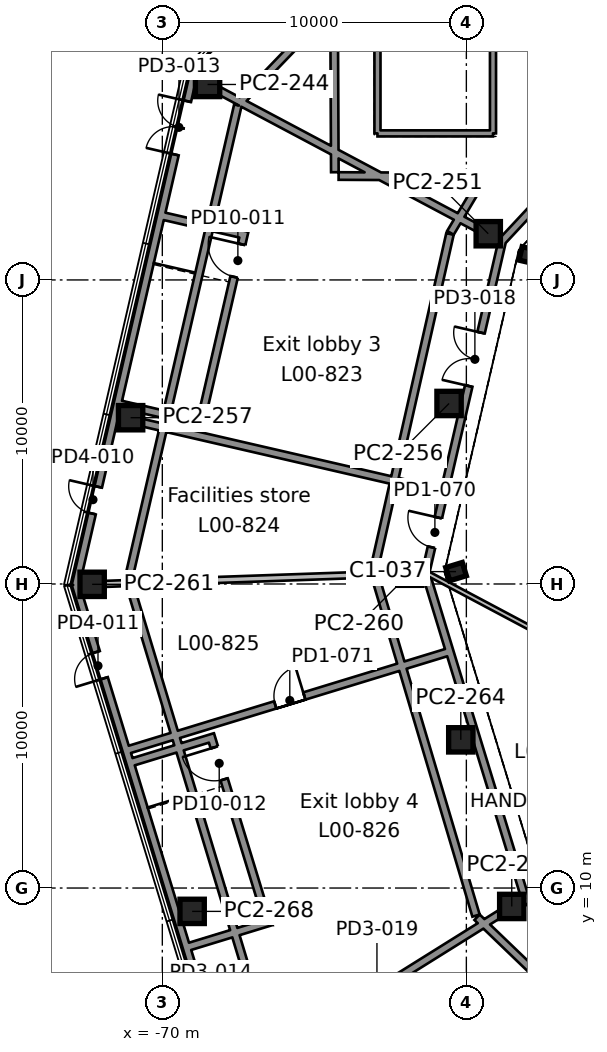
"""IFC4 building model, lengths in metres.
Left out: names, types, materials, properties, quantities, classifications, styles, units other than length and angle.
Written with IfcOpenShell. Run it as: python <this file> out.ifc"""

import sys

from ifc_helpers import new_model, si_unit, direction, frame, frame_2d, origin, origin_2d, place, context, subcontext, project, spatial, rectangle, i_section, extrude, element, fill, save


model = new_model("IFC4")
c1 = context("Model", 3, precision=1e-05, world=origin(), true_north=direction((0.0, 1.0)))
c2 = subcontext(c1, "Body", "Model", "MODEL_VIEW")
j1 = project(units=[si_unit("LENGTHUNIT", "METRE"), si_unit("PLANEANGLEUNIT", "RADIAN")], contexts=[c1])
p1 = place(None, origin())
s1 = spatial("IfcSite", under=j1, at=p1, CompositionType="ELEMENT")
p2 = place(p1, origin())
s2 = spatial("IfcBuilding", under=s1, at=p2, CompositionType="ELEMENT")
p3 = place(p2, origin())
s3 = spatial("IfcBuildingStorey", under=s2, at=p3, CompositionType="ELEMENT", Elevation=0.0)
for number, where, z_axis, x_axis in (
    (1, (-60.34, 20.407, 0.0), (0.0, 0.0, 1.0), (0.292, -0.956, 0.0)),
    (2, (-57.939, 30.807, 0.0), (0.0, 0.0, 1.0), (-0.225, -0.974, 0.0)),
):
    element("IfcColumn", number, at=place(p3, frame(where, z_axis=z_axis, x_axis=x_axis)), inside=s3, PredefinedType="COLUMN", context=c2, shape_type="SweptSolid", body=[
        extrude(i_section(OverallWidth=0.455, OverallDepth=0.569, WebThickness=0.078, FlangeThickness=0.125, FilletRadius=0.015, at=origin_2d()), origin(), (0.0, 0.0, 1.0), 7.0),
    ])
for number, where, z_axis, x_axis in (
    (3, (-69.019, 9.232, 0.0), (0.0, 0.0, 1.0), (1.0, 0.0, 0.0)),
    (4, (-58.507, 9.394, 0.0), (0.0, 0.0, 1.0), (1.0, 0.0, 0.0)),
    (5, (-60.183, 14.874, 0.0), (0.0, 0.0, 1.0), (1.0, 0.0, 0.0)),
    (6, (-72.308, 19.989, 0.0), (0.0, 0.0, 1.0), (1.0, 0.0, 0.0)),
    (7, (-61.858, 20.354, 0.0), (0.0, 0.0, 1.0), (1.0, 0.0, 0.0)),
    (8, (-71.043, 25.469, 0.0), (0.0, 0.0, 1.0), (1.0, 0.0, 0.0)),
    (9, (-60.569, 25.937, 0.0), (0.0, 0.0, 1.0), (1.0, 0.0, 0.0)),
    (10, (-59.28, 31.52, 0.0), (0.0, 0.0, 1.0), (1.0, 0.0, 0.0)),
    (11, (-68.512, 36.429, 0.0), (0.0, 0.0, 1.0), (1.0, 0.0, 0.0)),
):
    element("IfcColumn", number, at=place(p3, frame(where, z_axis=z_axis, x_axis=x_axis)), inside=s3, PredefinedType="COLUMN", context=c2, shape_type="SweptSolid", body=[
        extrude(rectangle(XDim=0.8, YDim=0.8, at=origin_2d()), origin(), (0.0, 0.0, 1.0), 6.37),
    ])
p4 = place(p3, frame((-69.034, 36.837, 0.0), z_axis=(0.0, 0.0, 1.0), x_axis=(-0.224951161352, -0.974370040081, 0.0)))
e12 = element("IfcWall", 12, at=p4, inside=s3, PredefinedType="SOLIDWALL", context=c2, shape_type="SweptSolid", body=[
    extrude(rectangle(XDim=17.314, YDim=0.4, at=frame_2d((8.657, 0.0))), origin(), (0.0, 0.0, 1.0), 6.37),
])
p5 = place(p4, frame((0.966, 0.0, 0.0)))
e13 = element("IfcOpeningElement", 13, at=p5, cuts=e12, PredefinedType="OPENING", context=c2, shape_type="SweptSolid", body=[
    extrude(rectangle(XDim=1.8, YDim=2.1, at=frame_2d((0.9, 1.05))), frame((0.0, 0.21, 0.0), z_axis=(0.0, -1.0, 0.0), x_axis=(1.0, 0.0, 0.0)), (0.0, 0.0, 1.0), 0.42),
])
p6 = place(p4, frame((13.984, 0.0, 0.0)))
e14 = element("IfcOpeningElement", 14, at=p6, cuts=e12, PredefinedType="OPENING", context=c2, shape_type="SweptSolid", body=[
    extrude(rectangle(XDim=0.9, YDim=2.1, at=frame_2d((0.45, 1.05))), frame((0.0, 0.21, 0.0), z_axis=(0.0, -1.0, 0.0), x_axis=(1.0, 0.0, 0.0)), (0.0, 0.0, 1.0), 0.42),
])
p7 = place(p3, frame((-72.929, 19.967, 0.0), z_axis=(0.0, 0.0, 1.0), x_axis=(0.292376176059, -0.956303388927, 0.0)))
e15 = element("IfcWall", 15, at=p7, inside=s3, PredefinedType="SOLIDWALL", context=c2, shape_type="SweptSolid", body=[
    extrude(rectangle(XDim=17.194, YDim=0.4, at=frame_2d((8.597, 0.0))), origin(), (0.0, 0.0, 1.0), 6.37),
])
p8 = place(p7, frame((2.33, 0.0, 0.0)))
e16 = element("IfcOpeningElement", 16, at=p8, cuts=e15, PredefinedType="OPENING", context=c2, shape_type="SweptSolid", body=[
    extrude(rectangle(XDim=0.9, YDim=2.1, at=frame_2d((0.45, 1.05))), frame((0.0, 0.21, 0.0), z_axis=(0.0, -1.0, 0.0), x_axis=(1.0, 0.0, 0.0)), (0.0, 0.0, 1.0), 0.42),
])
p9 = place(p7, frame((14.548, 0.0, 0.0)))
e17 = element("IfcOpeningElement", 17, at=p9, cuts=e15, PredefinedType="OPENING", context=c2, shape_type="SweptSolid", body=[
    extrude(rectangle(XDim=1.8, YDim=2.1, at=frame_2d((0.9, 1.05))), frame((0.0, 0.21, 0.0), z_axis=(0.0, -1.0, 0.0), x_axis=(1.0, 0.0, 0.0)), (0.0, 0.0, 1.0), 0.42),
])
p10 = place(p3, frame((-66.428, 4.605, 7.0), z_axis=(0.0, 0.0, 1.0), x_axis=(-0.289217899345, 0.957263290166, 0.0)))
e18 = element("IfcWall", 18, at=p10, inside=s3, PredefinedType="STANDARD", context=c2, shape_type="SweptSolid", body=[
    extrude(rectangle(XDim=16.189, YDim=0.25, at=frame_2d((8.094, 0.0))), origin(), (0.0, 0.0, 1.0), 0.65),
])
p11 = place(p3, frame((-71.112, 20.166, 7.0), z_axis=(0.0, 0.0, 1.0), x_axis=(0.22494984807, 0.974370343275, 0.0)))
e19 = element("IfcWall", 19, at=p11, inside=s3, PredefinedType="STANDARD", context=c2, shape_type="SweptSolid", body=[
    extrude(rectangle(XDim=15.987, YDim=0.25, at=frame_2d((7.993, 0.0))), origin(), (0.0, 0.0, 1.0), 0.65),
])
p12 = place(p3, frame((-67.484, 35.801, 7.0), z_axis=(0.0, 0.0, 1.0), x_axis=(0.693207741867, 0.720737834872, 0.0)))
e20 = element("IfcWall", 20, at=p12, inside=s3, PredefinedType="STANDARD", context=c2, shape_type="SweptSolid", body=[
    extrude(rectangle(XDim=3.991, YDim=0.25, at=frame_2d((1.995, 0.0))), origin(), (0.0, 0.0, 1.0), 0.65),
])
p13 = place(p3, frame((-64.348, 38.44, 7.0), z_axis=(0.0, 0.0, 1.0), x_axis=(0.004635810811, -0.999989254571, 0.0)))
e21 = element("IfcWall", 21, at=p13, inside=s3, PredefinedType="STANDARD", context=c2, shape_type="SweptSolid", body=[
    extrude(rectangle(XDim=4.898, YDim=0.25, at=frame_2d((2.449, 0.0))), origin(), (0.0, 0.0, 1.0), 0.65),
])
p14 = place(p3, frame((-64.201, 33.418, 7.0), z_axis=(0.0, 0.0, 1.0), x_axis=(0.99998580333, -0.005328521155, 0.0)))
e22 = element("IfcWall", 22, at=p14, inside=s3, PredefinedType="STANDARD", context=c2, shape_type="SweptSolid", body=[
    extrude(rectangle(XDim=4.261, YDim=0.25, at=frame_2d((2.13, 0.0))), origin(), (0.0, 0.0, 1.0), 0.65),
])
p15 = place(p3, frame((-59.854, 33.36, 7.0), z_axis=(0.0, 0.0, 1.0), x_axis=(0.715006669013, -0.699117631924, 0.0)))
e23 = element("IfcWall", 23, at=p15, inside=s3, PredefinedType="STANDARD", context=c2, shape_type="SweptSolid", body=[
    extrude(rectangle(XDim=0.261, YDim=0.25, at=frame_2d((0.131, 0.0))), origin(), (0.0, 0.0, 1.0), 0.65),
])
p16 = place(p3, frame((-59.647, 33.024, 7.0), z_axis=(0.0, 0.0, 1.0), x_axis=(-0.511061192034, -0.859544331606, 0.0)))
e24 = element("IfcWall", 24, at=p16, inside=s3, PredefinedType="STANDARD", context=c2, shape_type="SweptSolid", body=[
    extrude(rectangle(XDim=1.716, YDim=0.25, at=frame_2d((0.858, 0.0))), origin(), (0.0, 0.0, 1.0), 0.65),
])
p17 = place(p3, frame((-60.539, 31.513, 7.0), z_axis=(0.0, 0.0, 1.0), x_axis=(-0.220607009729, -0.975362777257, 0.0)))
e25 = element("IfcWall", 25, at=p17, inside=s3, PredefinedType="STANDARD", context=c2, shape_type="SweptSolid", body=[
    extrude(rectangle(XDim=11.344, YDim=0.25, at=frame_2d((5.672, 0.0))), origin(), (0.0, 0.0, 1.0), 0.65),
])
p18 = place(p3, frame((-63.039, 20.385, 7.0), z_axis=(0.0, 0.0, 1.0), x_axis=(0.284972326549, -0.9585357443, 0.0)))
e26 = element("IfcWall", 26, at=p18, inside=s3, PredefinedType="STANDARD", context=c2, shape_type="SweptSolid", body=[
    extrude(rectangle(XDim=11.781, YDim=0.25, at=frame_2d((5.89, 0.0))), origin(), (0.0, 0.0, 1.0), 0.65),
])
p19 = place(p3, frame((-59.649, 9.039, 7.0), z_axis=(0.0, 0.0, 1.0), x_axis=(0.721064848091, -0.692867581034, 0.0)))
e27 = element("IfcWall", 27, at=p19, inside=s3, PredefinedType="STANDARD", context=c2, shape_type="SweptSolid", body=[
    extrude(rectangle(XDim=11.94, YDim=0.25, at=frame_2d((5.97, 0.0))), origin(), (0.0, 0.0, 1.0), 0.65),
])
for number, where, z_axis, x_axis in (
    (28, (-59.124, 34.82, 6.92), (0.0, 0.0, 1.0), (-1.0, 0.0, 0.0)),
    (29, (-62.924, 34.82, 6.92), (0.0, 0.0, 1.0), (0.0, 1.0, 0.0)),
    (30, (-59.124, 38.62, 6.92), (0.0, 0.0, 1.0), (0.0, -1.0, 0.0)),
):
    element("IfcWall", number, at=place(p3, frame(where, z_axis=z_axis, x_axis=x_axis)), inside=s3, PredefinedType="SOLIDWALL", context=c2, shape_type="SweptSolid", body=[
        extrude(rectangle(XDim=3.8, YDim=0.2, at=frame_2d((1.9, 0.0))), origin(), (0.0, 0.0, 1.0), 0.18),
    ])
p20 = place(p3, frame((-68.112, 36.216, 0.0), z_axis=(0.0, 0.0, 1.0), x_axis=(0.882949504028, -0.469467968382, 0.0)))
e31 = element("IfcWall", 31, at=p20, inside=s3, PredefinedType="SOLIDWALL", context=c2, shape_type="SweptSolid", body=[
    extrude(rectangle(XDim=9.55, YDim=0.25, at=frame_2d((4.775, 0.0))), origin(), (0.0, 0.0, 1.0), 6.37),
])
p21 = place(p3, frame((-58.824, 31.273, 0.0), z_axis=(0.0, 0.0, 1.0), x_axis=(0.681856343792, 0.73148610816, 0.0)))
e32 = element("IfcWall", 32, at=p21, inside=s3, PredefinedType="SOLIDWALL", context=c2, shape_type="SweptSolid", body=[
    extrude(rectangle(XDim=5.519, YDim=0.25, at=frame_2d((2.76, 0.0))), origin(), (0.0, 0.0, 1.0), 6.37),
])
p22 = place(p3, frame((-70.643, 25.303, 0.0), z_axis=(0.0, 0.0, 1.0), x_axis=(0.974368540913, -0.224957654857, 0.0)))
e33 = element("IfcWall", 33, at=p22, inside=s3, PredefinedType="SOLIDWALL", context=c2, shape_type="SweptSolid", body=[
    extrude(rectangle(XDim=10.173, YDim=0.25, at=frame_2d((5.087, 0.0))), origin(), (0.0, 0.0, 1.0), 6.37),
])
p23 = place(p3, frame((-60.731, 23.01, 0.0), z_axis=(0.0, 0.0, 1.0), x_axis=(0.225176723851, 0.974317937347, 0.0)))
e34 = element("IfcWall", 34, at=p23, inside=s3, PredefinedType="SOLIDWALL", context=c2, shape_type="SweptSolid", body=[
    extrude(rectangle(XDim=8.487, YDim=0.25, at=frame_2d((4.244, 0.0))), origin(), (0.0, 0.0, 1.0), 6.37),
])
p24 = place(p23, frame((3.594, 0.0, 0.0)))
e35 = element("IfcOpeningElement", 35, at=p24, cuts=e34, PredefinedType="OPENING", context=c2, shape_type="SweptSolid", body=[
    extrude(rectangle(XDim=1.8, YDim=2.1, at=frame_2d((0.9, 1.05))), frame((0.0, 0.135, 0.0), z_axis=(0.0, -1.0, 0.0), x_axis=(1.0, 0.0, 0.0)), (0.0, 0.0, 1.0), 0.27),
])
p25 = place(p3, frame((-71.908, 20.003, 0.0), z_axis=(0.0, 0.0, 1.0), x_axis=(0.999391072451, 0.034892467742, 0.0)))
e36 = element("IfcWall", 36, at=p25, inside=s3, PredefinedType="PARTITIONING", context=c2, shape_type="SweptSolid", body=[
    extrude(rectangle(XDim=9.656, YDim=0.2, at=frame_2d((4.828, 0.0))), origin(), (0.0, 0.0, 1.0), 6.37),
])
p26 = place(p3, frame((-61.338, 20.382, 0.0), z_axis=(0.0, 0.0, 1.0), x_axis=(0.224998426256, 0.974359126905, 0.0)))
e37 = element("IfcWall", 37, at=p26, inside=s3, PredefinedType="SOLIDWALL", context=c2, shape_type="SweptSolid", body=[
    extrude(rectangle(XDim=2.695, YDim=0.25, at=frame_2d((1.348, 0.0))), origin(), (0.0, 0.0, 1.0), 6.37),
])
p27 = place(p26, frame((0.848, 0.0, 0.0)))
e38 = element("IfcOpeningElement", 38, at=p27, cuts=e37, PredefinedType="OPENING", context=c2, shape_type="SweptSolid", body=[
    extrude(rectangle(XDim=1.0, YDim=2.1, at=frame_2d((0.5, 1.05))), frame((0.0, 0.135, 0.0), z_axis=(0.0, -1.0, 0.0), x_axis=(1.0, 0.0, 0.0)), (0.0, 0.0, 1.0), 0.27),
])
p28 = place(p3, frame((-71.067, 14.562, 0.0), z_axis=(0.0, 0.0, 1.0), x_axis=(0.956304866869, 0.292371341965, 0.0)))
e39 = element("IfcWall", 39, at=p28, inside=s3, PredefinedType="SOLIDWALL", context=c2, shape_type="SweptSolid", body=[
    extrude(rectangle(XDim=11.0, YDim=0.25, at=frame_2d((5.5, 0.0))), origin(), (0.0, 0.0, 1.0), 6.37),
])
p29 = place(p28, frame((5.0, 0.0, 0.0)))
e40 = element("IfcOpeningElement", 40, at=p29, cuts=e39, PredefinedType="OPENING", context=c2, shape_type="SweptSolid", body=[
    extrude(rectangle(XDim=1.0, YDim=2.1, at=frame_2d((0.5, 1.05))), frame((0.0, 0.135, 0.0), z_axis=(0.0, -1.0, 0.0), x_axis=(1.0, 0.0, 0.0)), (0.0, 0.0, 1.0), 0.27),
])
p30 = place(p3, frame((-60.549, 17.783, 0.0), z_axis=(0.0, 0.0, 1.0), x_axis=(-0.291634808329, 0.956529737421, 0.0)))
e41 = element("IfcWall", 41, at=p30, inside=s3, PredefinedType="SOLIDWALL", context=c2, shape_type="SweptSolid", body=[
    extrude(rectangle(XDim=2.71, YDim=0.25, at=frame_2d((1.355, 0.0))), origin(), (0.0, 0.0, 1.0), 6.37),
])
p31 = place(p3, frame((-58.065, 9.666, 0.0), z_axis=(0.0, 0.0, 1.0), x_axis=(-0.292613894095, 0.956230677704, 0.0)))
e42 = element("IfcWall", 42, at=p31, inside=s3, PredefinedType="SOLIDWALL", context=c2, shape_type="SweptSolid", body=[
    extrude(rectangle(XDim=8.487, YDim=0.25, at=frame_2d((4.244, 0.0))), origin(), (0.0, 0.0, 1.0), 6.37),
])
p32 = place(p3, frame((-66.975, 4.103, 0.0), z_axis=(0.0, 0.0, 1.0), x_axis=(0.848048758951, 0.529918203539, 0.0)))
e43 = element("IfcWall", 43, at=p32, inside=s3, PredefinedType="SOLIDWALL", context=c2, shape_type="SweptSolid", body=[
    extrude(rectangle(XDim=9.514, YDim=0.25, at=frame_2d((4.757, 0.0))), origin(), (0.0, 0.0, 1.0), 6.37),
])
p33 = place(p32, frame((3.857, 0.0, 0.0)))
e44 = element("IfcOpeningElement", 44, at=p33, cuts=e43, PredefinedType="OPENING", context=c2, shape_type="SweptSolid", body=[
    extrude(rectangle(XDim=1.8, YDim=2.1, at=frame_2d((0.9, 1.05))), frame((0.0, 0.135, 0.0), z_axis=(0.0, -1.0, 0.0), x_axis=(1.0, 0.0, 0.0)), (0.0, 0.0, 1.0), 0.27),
])
p34 = place(p3, frame((-61.338, 20.382, 0.0), z_axis=(0.0, 0.0, 1.0), x_axis=(0.882969363327, -0.4694306162, 0.0)))
e45 = element("IfcWall", 45, at=p34, inside=s3, PredefinedType="PARTITIONING", context=c2, shape_type="SweptSolid", body=[
    extrude(rectangle(XDim=0.799, YDim=0.15, at=frame_2d((0.4, 0.0))), origin(), (0.0, 0.0, 1.0), 6.55),
])
p35 = place(p3, frame((-60.632, 20.007, 0.0), z_axis=(0.0, 0.0, 1.0), x_axis=(0.882940733586, -0.469484462975, 0.0)))
e46 = element("IfcWall", 46, at=p35, inside=s3, PredefinedType="PARTITIONING", context=c2, shape_type="SweptSolid", body=[
    extrude(rectangle(XDim=9.83, YDim=0.15, at=frame_2d((4.915, 0.0))), origin(), (0.0, 0.0, 1.0), 6.55),
])
p36 = place(p35, frame((4.337, 0.0, 0.0)))
e47 = element("IfcOpeningElement", 47, at=p36, cuts=e46, PredefinedType="OPENING", context=c2, shape_type="SweptSolid", body=[
    extrude(rectangle(XDim=1.0, YDim=2.1, at=frame_2d((0.5, 1.05))), frame((0.0, 0.085, 0.0), z_axis=(0.0, -1.0, 0.0), x_axis=(1.0, 0.0, 0.0)), (0.0, 0.0, 1.0), 0.17),
])
p37 = place(p3, frame((-58.068, 9.669, 0.0), z_axis=(0.0, 0.0, 1.0), x_axis=(0.731356961262, -0.681994864507, 0.0)))
e48 = element("IfcWall", 48, at=p37, inside=s3, PredefinedType="SOLIDWALL", context=c2, shape_type="SweptSolid", body=[
    extrude(rectangle(XDim=3.121, YDim=0.25, at=frame_2d((1.561, 0.0))), origin(), (0.0, 0.0, 1.0), 6.37),
])
for number, where, z_axis, x_axis in (
    (49, (-69.925, 32.09, 0.0), (0.0, 0.0, 1.0), (0.974, -0.225, 0.0)),
    (50, (-71.353, 25.903, 0.0), (0.0, 0.0, 1.0), (0.974, -0.225, 0.0)),
):
    element("IfcWall", number, at=place(p3, frame(where, z_axis=z_axis, x_axis=x_axis)), inside=s3, PredefinedType="SOLIDWALL", context=c2, shape_type="SweptSolid", body=[
        extrude(rectangle(XDim=2.8, YDim=0.25, at=frame_2d((1.4, 0.0))), origin(), (0.0, 0.0, 1.0), 6.37),
    ])
p38 = place(p3, frame((-67.29, 31.61, 0.0), z_axis=(0.0, 0.0, 1.0), x_axis=(-0.224940552999, -0.974372489152, 0.0)))
e51 = element("IfcWall", 51, at=p38, inside=s3, PredefinedType="SOLIDWALL", context=c2, shape_type="SweptSolid", body=[
    extrude(rectangle(XDim=6.6, YDim=0.25, at=frame_2d((3.3, 0.0))), origin(), (0.0, 0.0, 1.0), 6.37),
])
p39 = place(p38, frame((0.45, 0.0, 0.0)))
e52 = element("IfcOpeningElement", 52, at=p39, cuts=e51, PredefinedType="OPENING", context=c2, shape_type="SweptSolid", body=[
    extrude(rectangle(XDim=1.1, YDim=2.1, at=frame_2d((0.55, 1.05))), frame((0.0, 0.135, 0.0), z_axis=(0.0, -1.0, 0.0), x_axis=(1.0, 0.0, 0.0)), (0.0, 0.0, 1.0), 0.27),
])
for number, where, z_axis, x_axis in (
    (53, (-70.943, 14.155, 0.0), (0.0, 0.0, 1.0), (0.956, 0.292, 0.0)),
    (54, (-69.086, 8.083, 0.0), (0.0, 0.0, 1.0), (0.956, 0.292, 0.0)),
):
    element("IfcWall", number, at=place(p3, frame(where, z_axis=z_axis, x_axis=x_axis)), inside=s3, PredefinedType="SOLIDWALL", context=c2, shape_type="SweptSolid", body=[
        extrude(rectangle(XDim=2.8, YDim=0.25, at=frame_2d((1.4, 0.0))), origin(), (0.0, 0.0, 1.0), 6.37),
    ])
p40 = place(p3, frame((-68.421, 15.057, 0.0), z_axis=(0.0, 0.0, 1.0), x_axis=(0.292369833763, -0.956305327971, 0.0)))
e55 = element("IfcWall", 55, at=p40, inside=s3, PredefinedType="SOLIDWALL", context=c2, shape_type="SweptSolid", body=[
    extrude(rectangle(XDim=6.6, YDim=0.25, at=frame_2d((3.3, 0.0))), origin(), (0.0, 0.0, 1.0), 6.37),
])
p41 = place(p40, frame((0.45, 0.0, 0.0)))
e56 = element("IfcOpeningElement", 56, at=p41, cuts=e55, PredefinedType="OPENING", context=c2, shape_type="SweptSolid", body=[
    extrude(rectangle(XDim=1.1, YDim=2.1, at=frame_2d((0.55, 1.05))), frame((0.0, 0.135, 0.0), z_axis=(0.0, -1.0, 0.0), x_axis=(1.0, 0.0, 0.0)), (0.0, 0.0, 1.0), 0.27),
])
p42 = place(p5, frame((1.8, 0.0, 0.0), z_axis=(0.0, 0.0, 1.0), x_axis=(-1.0, 0.0, 0.0)))
e57 = element("IfcDoor", 57, at=p42, inside=s3, OperationType="DOUBLE_DOOR_SINGLE_SWING", PredefinedType="DOOR", context=c2, shape_type="SweptSolid", body=[
    extrude(rectangle(XDim=1.8, YDim=2.1, at=frame_2d((0.9, 1.05))), frame((0.0, 0.025, 0.0), z_axis=(0.0, -1.0, 0.0), x_axis=(1.0, 0.0, 0.0)), (0.0, 0.0, 1.0), 0.05),
])
fill(e13, e57)
p43 = place(p6, frame((0.9, 0.0, 0.0), z_axis=(0.0, 0.0, 1.0), x_axis=(-1.0, 0.0, 0.0)))
e58 = element("IfcDoor", 58, at=p43, inside=s3, OperationType="SINGLE_SWING_RIGHT", PredefinedType="DOOR", context=c2, shape_type="SweptSolid", body=[
    extrude(rectangle(XDim=0.9, YDim=2.1, at=frame_2d((0.45, 1.05))), frame((0.0, 0.025, 0.0), z_axis=(0.0, -1.0, 0.0), x_axis=(1.0, 0.0, 0.0)), (0.0, 0.0, 1.0), 0.05),
])
fill(e14, e58)
p44 = place(p8, frame((0.9, 0.0, 0.0), z_axis=(0.0, 0.0, 1.0), x_axis=(-1.0, 0.0, 0.0)))
e59 = element("IfcDoor", 59, at=p44, inside=s3, OperationType="SINGLE_SWING_LEFT", PredefinedType="DOOR", context=c2, shape_type="SweptSolid", body=[
    extrude(rectangle(XDim=0.9, YDim=2.1, at=frame_2d((0.45, 1.05))), frame((0.0, 0.025, 0.0), z_axis=(0.0, -1.0, 0.0), x_axis=(1.0, 0.0, 0.0)), (0.0, 0.0, 1.0), 0.05),
])
fill(e16, e59)
p45 = place(p3, frame((0.0, 0.0, 6.37)))
p46 = place(p45, frame((-61.024, 36.72, 0.0)))
p47 = place(p46, frame((0.0, 0.0, 0.5)))
e60 = element("IfcWindow", 60, at=p47, inside=s3, PartitioningType="SINGLE_PANEL", PredefinedType="SKYLIGHT", context=c2, shape_type="SweptSolid", body=[
    extrude(rectangle(XDim=3.6, YDim=3.6, at=origin_2d()), origin(), (0.0, 0.0, 1.0), 0.05),
])
p48 = place(p39, frame((1.1, 0.0, 0.0), z_axis=(0.0, 0.0, 1.0), x_axis=(-1.0, 0.0, 0.0)))
e61 = element("IfcDoor", 61, at=p48, inside=s3, OperationType="SINGLE_SWING_RIGHT", PredefinedType="DOOR", context=c2, shape_type="SweptSolid", body=[
    extrude(rectangle(XDim=1.1, YDim=2.1, at=frame_2d((0.55, 1.05))), frame((0.0, 0.025, 0.0), z_axis=(0.0, -1.0, 0.0), x_axis=(1.0, 0.0, 0.0)), (0.0, 0.0, 1.0), 0.05),
])
fill(e52, e61)
p49 = place(p41, frame((1.1, 0.0, 0.0), z_axis=(0.0, 0.0, 1.0), x_axis=(-1.0, 0.0, 0.0)))
e62 = element("IfcDoor", 62, at=p49, inside=s3, OperationType="SINGLE_SWING_RIGHT", PredefinedType="DOOR", context=c2, shape_type="SweptSolid", body=[
    extrude(rectangle(XDim=1.1, YDim=2.1, at=frame_2d((0.55, 1.05))), frame((0.0, 0.025, 0.0), z_axis=(0.0, -1.0, 0.0), x_axis=(1.0, 0.0, 0.0)), (0.0, 0.0, 1.0), 0.05),
])
fill(e56, e62)
p50 = place(p24, origin())
e63 = element("IfcDoor", 63, at=p50, inside=s3, OperationType="DOUBLE_DOOR_SINGLE_SWING", PredefinedType="DOOR", context=c2, shape_type="SweptSolid", body=[
    extrude(rectangle(XDim=1.8, YDim=2.1, at=frame_2d((0.9, 1.05))), frame((0.0, 0.025, 0.0), z_axis=(0.0, -1.0, 0.0), x_axis=(1.0, 0.0, 0.0)), (0.0, 0.0, 1.0), 0.05),
])
fill(e35, e63)
p51 = place(p27, origin())
e64 = element("IfcDoor", 64, at=p51, inside=s3, OperationType="SINGLE_SWING_RIGHT", PredefinedType="DOOR", context=c2, shape_type="SweptSolid", body=[
    extrude(rectangle(XDim=1.0, YDim=2.1, at=frame_2d((0.5, 1.05))), frame((0.0, 0.025, 0.0), z_axis=(0.0, -1.0, 0.0), x_axis=(1.0, 0.0, 0.0)), (0.0, 0.0, 1.0), 0.05),
])
fill(e38, e64)
p52 = place(p29, origin())
e65 = element("IfcDoor", 65, at=p52, inside=s3, OperationType="SINGLE_SWING_RIGHT", PredefinedType="DOOR", context=c2, shape_type="SweptSolid", body=[
    extrude(rectangle(XDim=1.0, YDim=2.1, at=frame_2d((0.5, 1.05))), frame((0.0, 0.025, 0.0), z_axis=(0.0, -1.0, 0.0), x_axis=(1.0, 0.0, 0.0)), (0.0, 0.0, 1.0), 0.05),
])
fill(e40, e65)
save(model, sys.argv[1])
